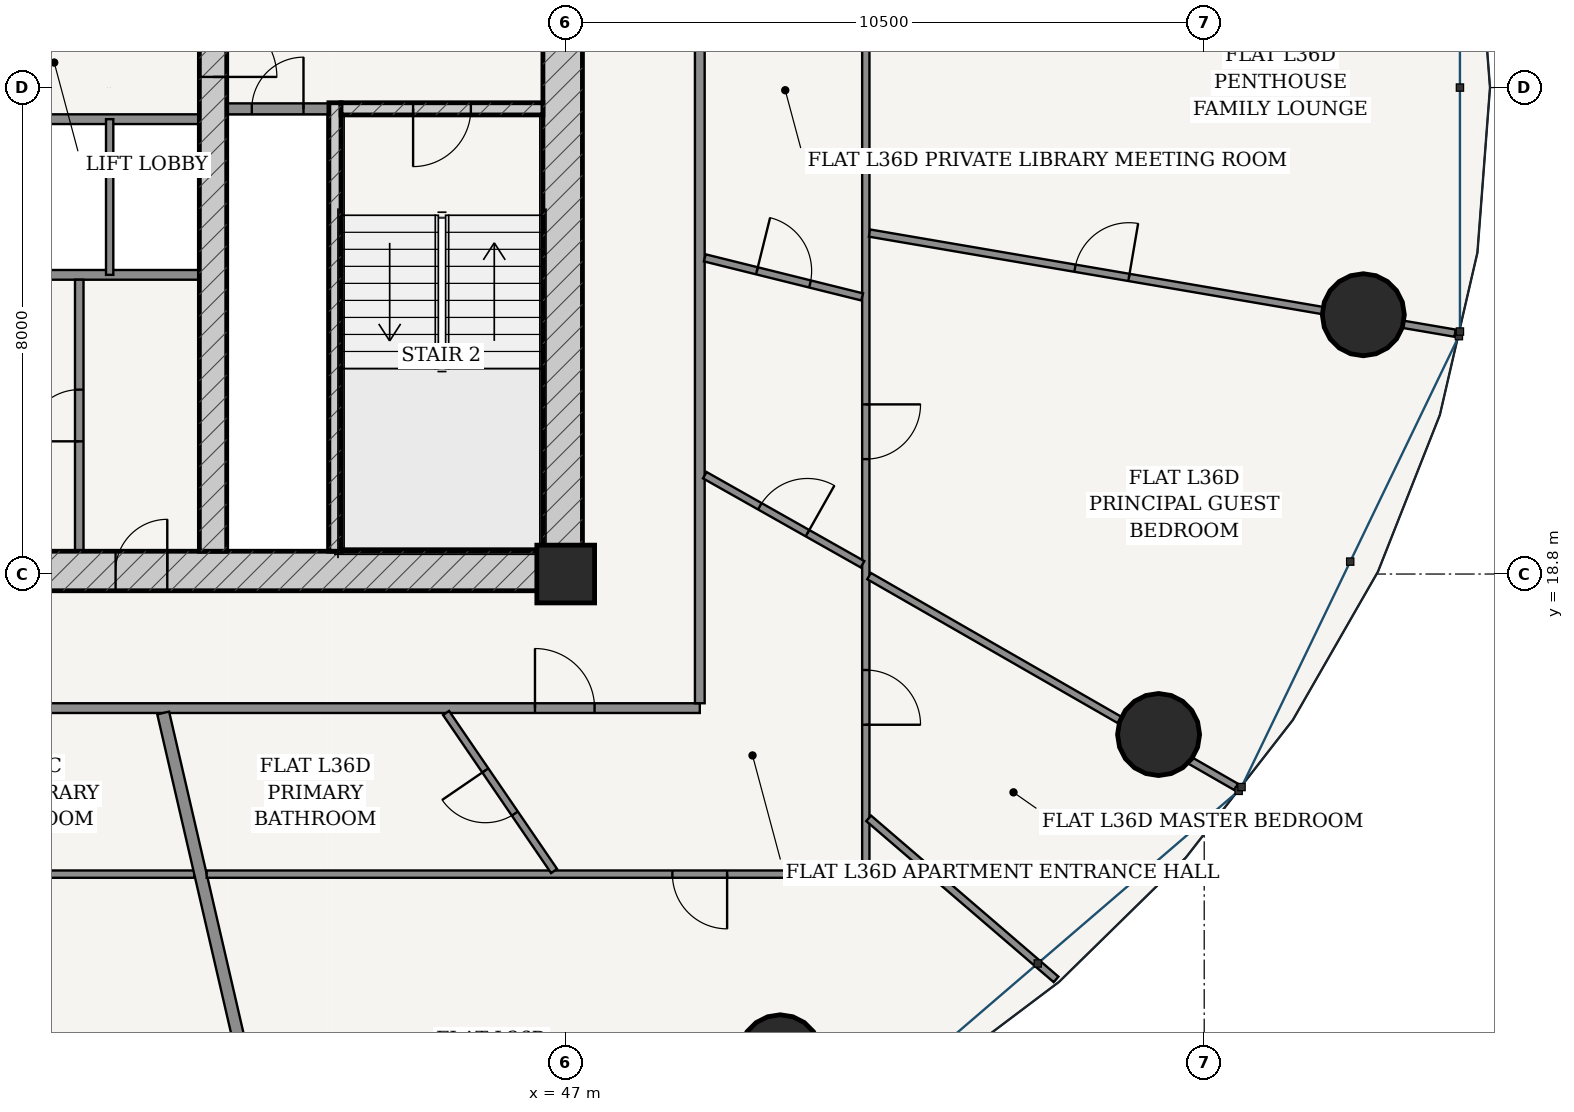
"""IFC4 building model, lengths in metres.
Left out: names, types, materials, properties, quantities, classifications, styles, units other than length and angle.
Written with IfcOpenShell. Run it as: python <this file> out.ifc"""

import sys

from ifc_helpers import new_model, si_unit, direction, frame, frame_2d, origin, origin_2d, place, context, subcontext, project, spatial, rectangle, hollow_circle, extrude, source, transform, mapped, element, fill, save


model = new_model("IFC4")
c1 = context("Model", 3, precision=1e-05, world=origin(), true_north=direction((-0.2419218956, 0.970295726276)))
c2 = subcontext(c1, "Body", "Model", "MODEL_VIEW")
j1 = project(units=[si_unit("LENGTHUNIT", "METRE"), si_unit("PLANEANGLEUNIT", "RADIAN")], contexts=[c1])
p1 = place(None, origin())
s1 = spatial("IfcSite", under=j1, at=p1, CompositionType="ELEMENT")
p2 = place(p1, origin())
s2 = spatial("IfcBuilding", under=s1, at=p2, CompositionType="ELEMENT")
p3 = place(p2, frame((0.0, 0.0, 139.0)))
s3 = spatial("IfcBuildingStorey", under=s2, at=p3, CompositionType="ELEMENT", Elevation=139.0)
p4 = place(p3, frame((47.0, 18.8, 0.0), z_axis=(0.0, 0.0, 1.0), x_axis=(1.0, 0.0, 0.0)))
e1 = element("IfcColumn", 1, at=p4, inside=s3, PredefinedType="COLUMN", context=c2, shape_type="SweptSolid", body=[
    extrude(rectangle(XDim=0.95, YDim=0.95, at=origin_2d()), origin(), (0.0, 0.0, 1.0), 3.6),
])
p5 = place(p3, frame((28.725, 18.85, 0.0), z_axis=(0.0, 0.0, 1.0), x_axis=(1.0, 0.0, 0.0)))
e2 = element("IfcWall", 2, at=p5, inside=s3, PredefinedType="SHEAR", context=c2, shape_type="SweptSolid", body=[
    extrude(rectangle(XDim=18.55, YDim=0.65, at=frame_2d((9.275, 0.0))), origin(), (0.0, 0.0, 1.0), 3.33),
])
p6 = place(p5, frame((6.827, 0.0, 0.0)))
e3 = element("IfcOpeningElement", 3, at=p6, cuts=e2, PredefinedType="OPENING", context=c2, shape_type="SweptSolid", body=[
    extrude(rectangle(XDim=0.85, YDim=2.1, at=frame_2d((0.425, 1.05))), frame((0.0, 0.335, 0.0), z_axis=(0.0, -1.0, 0.0), x_axis=(1.0, 0.0, 0.0)), (0.0, 0.0, 1.0), 0.67),
])
p7 = place(p5, frame((8.85, 0.0, 0.0)))
e4 = element("IfcOpeningElement", 4, at=p7, cuts=e2, PredefinedType="OPENING", context=c2, shape_type="SweptSolid", body=[
    extrude(rectangle(XDim=0.85, YDim=2.1, at=frame_2d((0.425, 1.05))), frame((0.0, 0.335, 0.0), z_axis=(0.0, -1.0, 0.0), x_axis=(1.0, 0.0, 0.0)), (0.0, 0.0, 1.0), 0.67),
])
p8 = place(p5, frame((10.873, 0.0, 0.0)))
e5 = element("IfcOpeningElement", 5, at=p8, cuts=e2, PredefinedType="OPENING", context=c2, shape_type="SweptSolid", body=[
    extrude(rectangle(XDim=0.85, YDim=2.1, at=frame_2d((0.425, 1.05))), frame((0.0, 0.335, 0.0), z_axis=(0.0, -1.0, 0.0), x_axis=(1.0, 0.0, 0.0)), (0.0, 0.0, 1.0), 0.67),
])
p9 = place(p3, frame((46.95, 19.175, 0.0), z_axis=(0.0, 0.0, 1.0), x_axis=(0.0, 1.0, 0.0)))
e6 = element("IfcWall", 6, at=p9, inside=s3, PredefinedType="SHEAR", context=c2, shape_type="SweptSolid", body=[
    extrude(rectangle(XDim=15.25, YDim=0.65, at=frame_2d((7.625, 0.0))), origin(), (0.0, 0.0, 1.0), 3.33),
])
p10 = place(p9, frame((9.875, 0.0, 0.0)))
e7 = element("IfcOpeningElement", 7, at=p10, cuts=e6, PredefinedType="OPENING", context=c2, shape_type="SweptSolid", body=[
    extrude(rectangle(XDim=1.5, YDim=2.2, at=frame_2d((0.75, 1.1))), frame((0.0, 0.335, 0.0), z_axis=(0.0, -1.0, 0.0), x_axis=(1.0, 0.0, 0.0)), (0.0, 0.0, 1.0), 0.67),
])
p11 = place(p3, frame((43.205, 19.175, 0.0), z_axis=(0.0, 0.0, 1.0), x_axis=(0.0, 1.0, 0.0)))
e8 = element("IfcWall", 8, at=p11, inside=s3, PredefinedType="SOLIDWALL", context=c2, shape_type="SweptSolid", body=[
    extrude(rectangle(XDim=7.375, YDim=0.2, at=frame_2d((3.688, 0.0))), origin(), (0.0, 0.0, 1.0), 3.33),
])
p12 = place(p3, frame((43.305, 26.45, 0.0), z_axis=(0.0, 0.0, 1.0), x_axis=(1.0, 0.0, 0.0)))
e9 = element("IfcWall", 9, at=p12, inside=s3, PredefinedType="SOLIDWALL", context=c2, shape_type="SweptSolid", body=[
    extrude(rectangle(XDim=3.32, YDim=0.2, at=frame_2d((1.66, 0.0))), origin(), (0.0, 0.0, 1.0), 3.33),
])
p13 = place(p12, frame((1.185, 0.0, 0.0)))
e10 = element("IfcOpeningElement", 10, at=p13, cuts=e9, PredefinedType="OPENING", context=c2, shape_type="SweptSolid", body=[
    extrude(rectangle(XDim=0.95, YDim=2.15, at=frame_2d((0.475, 1.075))), frame((0.0, 0.11, 0.0), z_axis=(0.0, -1.0, 0.0), x_axis=(1.0, 0.0, 0.0)), (0.0, 0.0, 1.0), 0.22),
])
p14 = place(p3, frame((41.2, 19.175, 0.0), z_axis=(0.0, 0.0, 1.0), x_axis=(0.0, 1.0, 0.0)))
e11 = element("IfcWall", 11, at=p14, inside=s3, PredefinedType="SHEAR", context=c2, shape_type="SweptSolid", body=[
    extrude(rectangle(XDim=15.25, YDim=0.45, at=frame_2d((7.625, 0.0))), origin(), (0.0, 0.0, 1.0), 3.33),
])
p15 = place(p14, frame((7.8, 0.0, 0.0)))
e12 = element("IfcOpeningElement", 12, at=p15, cuts=e11, PredefinedType="OPENING", context=c2, shape_type="SweptSolid", body=[
    extrude(rectangle(XDim=1.05, YDim=2.15, at=frame_2d((0.525, 1.075))), frame((0.0, 0.235, 0.0), z_axis=(0.0, -1.0, 0.0), x_axis=(1.0, 0.0, 0.0)), (0.0, 0.0, 1.0), 0.47),
])
for number, where, z_axis, x_axis in (
    (13, (50.528, 10.877, 0.0), (0.0, 0.0, 1.0), (1.0, 0.0, 0.0)),
    (14, (56.75, 16.161, 0.0), (0.0, 0.0, 1.0), (1.0, 0.0, 0.0)),
    (15, (60.117, 23.064, 0.0), (0.0, 0.0, 1.0), (1.0, 0.0, 0.0)),
):
    element("IfcColumn", number, at=place(p3, frame(where, z_axis=z_axis, x_axis=x_axis)), inside=s3, PredefinedType="COLUMN", context=c2, shape_type="SweptSolid", body=[
        extrude(hollow_circle(Radius=0.675, WallThickness=0.042, at=origin_2d()), origin(), (0.0, 0.0, 1.0), 3.6),
    ])
p16 = place(p3, frame((41.425, 26.45, 0.0), z_axis=(0.0, 0.0, 1.0), x_axis=(1.0, 0.0, 0.0)))
e16 = element("IfcWall", 16, at=p16, inside=s3, PredefinedType="PARTITIONING", context=c2, shape_type="SweptSolid", body=[
    extrude(rectangle(XDim=1.675, YDim=0.18, at=frame_2d((0.837, 0.0))), origin(), (0.0, 0.0, 1.0), 3.33),
])
p17 = place(p16, frame((0.413, 0.0, 0.0)))
e17 = element("IfcOpeningElement", 17, at=p17, cuts=e16, PredefinedType="OPENING", context=c2, shape_type="SweptSolid", body=[
    extrude(rectangle(XDim=0.85, YDim=2.1, at=frame_2d((0.425, 1.05))), frame((0.0, 0.1, 0.0), z_axis=(0.0, -1.0, 0.0), x_axis=(1.0, 0.0, 0.0)), (0.0, 0.0, 1.0), 0.2),
])
p18 = place(p3, frame((35.025, 26.28, 0.0), z_axis=(0.0, 0.0, 1.0), x_axis=(1.0, 0.0, 0.0)))
e18 = element("IfcWall", 18, at=p18, inside=s3, PredefinedType="PARTITIONING", context=c2, shape_type="SweptSolid", body=[
    extrude(rectangle(XDim=5.95, YDim=0.16, at=frame_2d((2.975, 0.0))), origin(), (0.0, 0.0, 1.0), 3.33),
])
p19 = place(p18, frame((0.19, 0.0, 0.0)))
e19 = element("IfcOpeningElement", 19, at=p19, cuts=e18, PredefinedType="OPENING", context=c2, shape_type="SweptSolid", body=[
    extrude(rectangle(XDim=1.1, YDim=2.2, at=frame_2d((0.55, 1.1))), frame((0.0, 0.09, 0.0), z_axis=(0.0, -1.0, 0.0), x_axis=(1.0, 0.0, 0.0)), (0.0, 0.0, 1.0), 0.18),
])
p20 = place(p18, frame((1.67, 0.0, 0.0)))
e20 = element("IfcOpeningElement", 20, at=p20, cuts=e18, PredefinedType="OPENING", context=c2, shape_type="SweptSolid", body=[
    extrude(rectangle(XDim=1.1, YDim=2.2, at=frame_2d((0.55, 1.1))), frame((0.0, 0.09, 0.0), z_axis=(0.0, -1.0, 0.0), x_axis=(1.0, 0.0, 0.0)), (0.0, 0.0, 1.0), 0.18),
])
p21 = place(p3, frame((35.025, 23.72, 0.0), z_axis=(0.0, 0.0, 1.0), x_axis=(1.0, 0.0, 0.0)))
e21 = element("IfcWall", 21, at=p21, inside=s3, PredefinedType="PARTITIONING", context=c2, shape_type="SweptSolid", body=[
    extrude(rectangle(XDim=5.95, YDim=0.16, at=frame_2d((2.975, 0.0))), origin(), (0.0, 0.0, 1.0), 3.33),
])
p22 = place(p3, frame((39.5, 23.72, 0.0), z_axis=(0.0, 0.0, 1.0), x_axis=(0.0, 1.0, 0.0)))
e22 = element("IfcWall", 22, at=p22, inside=s3, PredefinedType="PARTITIONING", context=c2, shape_type="SweptSolid", body=[
    extrude(rectangle(XDim=2.56, YDim=0.12, at=frame_2d((1.28, 0.0))), origin(), (0.0, 0.0, 1.0), 3.33),
])
p23 = place(p3, frame((39.0, 19.175, 0.0), z_axis=(0.0, 0.0, 1.0), x_axis=(0.0, 1.0, 0.0)))
e23 = element("IfcWall", 23, at=p23, inside=s3, PredefinedType="PARTITIONING", context=c2, shape_type="SweptSolid", body=[
    extrude(rectangle(XDim=4.465, YDim=0.14, at=frame_2d((2.232, 0.0))), origin(), (0.0, 0.0, 1.0), 3.33),
])
p24 = place(p23, frame((1.808, 0.0, 0.0)))
e24 = element("IfcOpeningElement", 24, at=p24, cuts=e23, PredefinedType="OPENING", context=c2, shape_type="SweptSolid", body=[
    extrude(rectangle(XDim=0.85, YDim=2.1, at=frame_2d((0.425, 1.05))), frame((0.0, 0.08, 0.0), z_axis=(0.0, -1.0, 0.0), x_axis=(1.0, 0.0, 0.0)), (0.0, 0.0, 1.0), 0.16),
])
p25 = place(p3, frame((34.32, 16.595, 0.0), z_axis=(0.0, 0.0, 1.0), x_axis=(1.0, 0.0, 0.0)))
e25 = element("IfcWall", 25, at=p25, inside=s3, PredefinedType="PARTITIONING", context=c2, shape_type="SweptSolid", body=[
    extrude(rectangle(XDim=14.885, YDim=0.16, at=frame_2d((7.442, 0.0))), origin(), (0.0, 0.0, 1.0), 2.776),
])
p26 = place(p25, frame((12.174, 0.0, 0.0)))
e26 = element("IfcOpeningElement", 26, at=p26, cuts=e25, PredefinedType="OPENING", context=c2, shape_type="SweptSolid", body=[
    extrude(rectangle(XDim=0.98, YDim=2.2, at=frame_2d((0.49, 1.1))), frame((0.0, 0.09, 0.0), z_axis=(0.0, -1.0, 0.0), x_axis=(1.0, 0.0, 0.0)), (0.0, 0.0, 1.0), 0.18),
])
p27 = place(p3, frame((49.205, 16.675, 0.0), z_axis=(0.0, 0.0, 1.0), x_axis=(0.0, 1.0, 0.0)))
e27 = element("IfcWall", 27, at=p27, inside=s3, PredefinedType="PARTITIONING", context=c2, shape_type="SweptSolid", body=[
    extrude(rectangle(XDim=18.4, YDim=0.16, at=frame_2d((9.2, 0.0))), origin(), (0.0, 0.0, 1.0), 2.776),
])
p28 = place(p3, frame((40.892, 13.865, 0.0), z_axis=(0.0, 0.0, 1.0), x_axis=(-1.0, 0.0, 0.0)))
e28 = element("IfcWall", 28, at=p28, inside=s3, PredefinedType="PARTITIONING", context=c2, shape_type="SweptSolid", body=[
    extrude(rectangle(XDim=9.302, YDim=0.12, at=frame_2d((4.651, 0.0))), origin(), (0.0, 0.0, 1.0), 2.776),
])
p29 = place(p28, frame((7.652, 0.0, 0.0)))
e29 = element("IfcOpeningElement", 29, at=p29, cuts=e28, PredefinedType="OPENING", context=c2, shape_type="SweptSolid", body=[
    extrude(rectangle(XDim=0.9, YDim=2.15, at=frame_2d((0.45, 1.075))), frame((0.0, 0.07, 0.0), z_axis=(0.0, -1.0, 0.0), x_axis=(1.0, 0.0, 0.0)), (0.0, 0.0, 1.0), 0.14),
])
p30 = place(p3, frame((40.38, 16.515, 0.0), z_axis=(0.0, 0.0, 1.0), x_axis=(0.225473598067, -0.974249278457, 0.0)))
e30 = element("IfcWall", 30, at=p30, inside=s3, PredefinedType="PARTITIONING", context=c2, shape_type="SweptSolid", body=[
    extrude(rectangle(XDim=10.278, YDim=0.2, at=frame_2d((5.139, 0.0))), origin(), (0.0, 0.0, 1.0), 2.776),
])
p31 = place(p3, frame((51.935, 29.08, 0.0), z_axis=(0.0, 0.0, 1.0), x_axis=(0.0, -1.0, 0.0)))
e31 = element("IfcWall", 31, at=p31, inside=s3, PredefinedType="PARTITIONING", context=c2, shape_type="SweptSolid", body=[
    extrude(rectangle(XDim=15.215, YDim=0.12, at=frame_2d((7.608, 0.0))), origin(), (0.0, 0.0, 1.0), 2.776),
])
p32 = place(p31, frame((11.859, 0.0, 0.0)))
e32 = element("IfcOpeningElement", 32, at=p32, cuts=e31, PredefinedType="OPENING", context=c2, shape_type="SweptSolid", body=[
    extrude(rectangle(XDim=0.9, YDim=2.15, at=frame_2d((0.45, 1.075))), frame((0.0, 0.07, 0.0), z_axis=(0.0, -1.0, 0.0), x_axis=(1.0, 0.0, 0.0)), (0.0, 0.0, 1.0), 0.14),
])
p33 = place(p31, frame((7.49, 0.0, 0.0)))
e33 = element("IfcOpeningElement", 33, at=p33, cuts=e31, PredefinedType="OPENING", context=c2, shape_type="SweptSolid", body=[
    extrude(rectangle(XDim=0.9, YDim=2.15, at=frame_2d((0.45, 1.075))), frame((0.0, 0.07, 0.0), z_axis=(0.0, -1.0, 0.0), x_axis=(1.0, 0.0, 0.0)), (0.0, 0.0, 1.0), 0.14),
])
p34 = place(p3, frame((51.935, 13.865, 0.0), z_axis=(0.0, 0.0, 1.0), x_axis=(-1.0, 0.0, 0.0)))
e34 = element("IfcWall", 34, at=p34, inside=s3, PredefinedType="PARTITIONING", context=c2, shape_type="SweptSolid", body=[
    extrude(rectangle(XDim=10.84, YDim=0.12, at=frame_2d((5.42, 0.0))), origin(), (0.0, 0.0, 1.0), 2.776),
])
p35 = place(p34, frame((2.281, 0.0, 0.0)))
e35 = element("IfcOpeningElement", 35, at=p35, cuts=e34, PredefinedType="OPENING", context=c2, shape_type="SweptSolid", body=[
    extrude(rectangle(XDim=0.9, YDim=2.15, at=frame_2d((0.45, 1.075))), frame((0.0, 0.07, 0.0), z_axis=(0.0, -1.0, 0.0), x_axis=(1.0, 0.0, 0.0)), (0.0, 0.0, 1.0), 0.14),
])
p36 = place(p3, frame((51.982, 14.782, 0.0), z_axis=(0.0, 0.0, 1.0), x_axis=(0.758356837469, -0.651839632935, 0.0)))
e36 = element("IfcWall", 36, at=p36, inside=s3, PredefinedType="PARTITIONING", context=c2, shape_type="SweptSolid", body=[
    extrude(rectangle(XDim=4.064, YDim=0.12, at=frame_2d((2.032, 0.0))), origin(), (0.0, 0.0, 1.0), 2.846),
])
p37 = place(p3, frame((51.989, 18.766, 0.0), z_axis=(0.0, 0.0, 1.0), x_axis=(0.86717064002, -0.498011125466, 0.0)))
e37 = element("IfcWall", 37, at=p37, inside=s3, PredefinedType="PARTITIONING", context=c2, shape_type="SweptSolid", body=[
    extrude(rectangle(XDim=6.961, YDim=0.12, at=frame_2d((3.48, 0.0))), origin(), (0.0, 0.0, 1.0), 2.776),
])
p38 = place(p3, frame((51.996, 24.407, 0.0), z_axis=(0.0, 0.0, 1.0), x_axis=(0.985698378271, -0.168519159369, 0.0)))
e38 = element("IfcWall", 38, at=p38, inside=s3, PredefinedType="PARTITIONING", context=c2, shape_type="SweptSolid", body=[
    extrude(rectangle(XDim=9.769, YDim=0.12, at=frame_2d((4.884, 0.0))), origin(), (0.0, 0.0, 1.0), 2.776),
])
p39 = place(p38, frame((3.428, 0.0, 0.0)))
e39 = element("IfcOpeningElement", 39, at=p39, cuts=e38, PredefinedType="OPENING", context=c2, shape_type="SweptSolid", body=[
    extrude(rectangle(XDim=0.9, YDim=2.15, at=frame_2d((0.45, 1.075))), frame((0.0, 0.07, 0.0), z_axis=(0.0, -1.0, 0.0), x_axis=(1.0, 0.0, 0.0)), (0.0, 0.0, 1.0), 0.14),
])
p40 = place(p3, frame((45.032, 16.515, 0.0), z_axis=(0.0, 0.0, 1.0), x_axis=(0.564486512722, -0.825442291717, 0.0)))
e40 = element("IfcWall", 40, at=p40, inside=s3, PredefinedType="PARTITIONING", context=c2, shape_type="SweptSolid", body=[
    extrude(rectangle(XDim=3.148, YDim=0.12, at=frame_2d((1.574, 0.0))), origin(), (0.0, 0.0, 1.0), 3.005),
])
p41 = place(p40, frame((1.144, 0.0, 0.0)))
e41 = element("IfcOpeningElement", 41, at=p41, cuts=e40, PredefinedType="OPENING", context=c2, shape_type="SweptSolid", body=[
    extrude(rectangle(XDim=0.86, YDim=2.15, at=frame_2d((0.43, 1.075))), frame((0.0, 0.07, 0.0), z_axis=(0.0, -1.0, 0.0), x_axis=(1.0, 0.0, 0.0)), (0.0, 0.0, 1.0), 0.14),
])
p42 = place(p3, frame((49.287, 20.426, 0.0), z_axis=(0.0, 0.0, 1.0), x_axis=(0.870723023576, -0.491773744942, 0.0)))
e42 = element("IfcWall", 42, at=p42, inside=s3, PredefinedType="PARTITIONING", context=c2, shape_type="SweptSolid", body=[
    extrude(rectangle(XDim=2.98, YDim=0.12, at=frame_2d((1.49, 0.0))), origin(), (0.0, 0.0, 1.0), 2.776),
])
p43 = place(p42, frame((1.04, 0.0, 0.0)))
e43 = element("IfcOpeningElement", 43, at=p43, cuts=e42, PredefinedType="OPENING", context=c2, shape_type="SweptSolid", body=[
    extrude(rectangle(XDim=0.9, YDim=2.15, at=frame_2d((0.45, 1.075))), frame((0.0, 0.07, 0.0), z_axis=(0.0, -1.0, 0.0), x_axis=(1.0, 0.0, 0.0)), (0.0, 0.0, 1.0), 0.14),
])
p44 = place(p3, frame((49.287, 23.999, 0.0), z_axis=(0.0, 0.0, 1.0), x_axis=(0.970571855633, -0.240811696256, 0.0)))
e44 = element("IfcWall", 44, at=p44, inside=s3, PredefinedType="PARTITIONING", context=c2, shape_type="SweptSolid", body=[
    extrude(rectangle(XDim=2.666, YDim=0.12, at=frame_2d((1.333, 0.0))), origin(), (0.0, 0.0, 1.0), 3.33),
])
p45 = place(p44, frame((0.883, 0.0, 0.0)))
e45 = element("IfcOpeningElement", 45, at=p45, cuts=e44, PredefinedType="OPENING", context=c2, shape_type="SweptSolid", body=[
    extrude(rectangle(XDim=0.9, YDim=2.15, at=frame_2d((0.45, 1.075))), frame((0.0, 0.07, 0.0), z_axis=(0.0, -1.0, 0.0), x_axis=(1.0, 0.0, 0.0)), (0.0, 0.0, 1.0), 0.14),
])
m1 = source(origin(), c2, "Body", "SweptSolid", [
    extrude(rectangle(XDim=1.05, YDim=2.15, at=frame_2d((0.525, 1.075))), frame((0.0, 0.025, 0.0), z_axis=(0.0, -1.0, 0.0), x_axis=(1.0, 0.0, 0.0)), (0.0, 0.0, 1.0), 0.05),
])
p46 = place(p15, frame((1.05, 0.0, 0.0), z_axis=(0.0, 0.0, 1.0), x_axis=(-1.0, 0.0, 0.0)))
e46 = element("IfcDoor", 46, at=p46, inside=s3, OperationType="SINGLE_SWING_RIGHT", PredefinedType="DOOR", context=c2, shape_type="MappedRepresentation", body=[
    mapped(m1, transform((0.0, 0.0, 0.0), scale=1.0)),
])
fill(e12, e46)
m2 = source(origin(), c2, "Body", "SweptSolid", [
    extrude(rectangle(XDim=0.95, YDim=2.15, at=frame_2d((0.475, 1.075))), frame((0.0, 0.025, 0.0), z_axis=(0.0, -1.0, 0.0), x_axis=(1.0, 0.0, 0.0)), (0.0, 0.0, 1.0), 0.05),
])
p47 = place(p13, frame((0.95, 0.0, 0.0), z_axis=(0.0, 0.0, 1.0), x_axis=(-1.0, 0.0, 0.0)))
e47 = element("IfcDoor", 47, at=p47, inside=s3, OperationType="SINGLE_SWING_RIGHT", PredefinedType="DOOR", context=c2, shape_type="MappedRepresentation", body=[
    mapped(m2, transform((0.0, 0.0, 0.0), scale=1.0)),
])
fill(e10, e47)
m3 = source(origin(), c2, "Body", "SweptSolid", [
    extrude(rectangle(XDim=0.85, YDim=2.1, at=frame_2d((0.425, 1.05))), frame((0.0, 0.025, 0.0), z_axis=(0.0, -1.0, 0.0), x_axis=(1.0, 0.0, 0.0)), (0.0, 0.0, 1.0), 0.05),
])
p48 = place(p17, origin())
e48 = element("IfcDoor", 48, at=p48, inside=s3, OperationType="SINGLE_SWING_RIGHT", PredefinedType="DOOR", context=c2, shape_type="MappedRepresentation", body=[
    mapped(m3, transform((0.0, 0.0, 0.0), scale=1.0)),
])
fill(e17, e48)
p49 = place(p8, origin())
e49 = element("IfcDoor", 49, at=p49, inside=s3, OperationType="SINGLE_SWING_RIGHT", PredefinedType="DOOR", context=c2, shape_type="MappedRepresentation", body=[
    mapped(m3, transform((0.0, 0.0, 0.0), scale=1.0)),
])
fill(e5, e49)
p50 = place(p24, origin())
e50 = element("IfcDoor", 50, at=p50, inside=s3, OperationType="SINGLE_SWING_LEFT", PredefinedType="DOOR", context=c2, shape_type="MappedRepresentation", body=[
    mapped(m3, transform((0.0, 0.0, 0.0), scale=1.0)),
])
fill(e24, e50)
m4 = source(origin(), c2, "Body", "SweptSolid", [
    extrude(rectangle(XDim=0.98, YDim=2.2, at=frame_2d((0.49, 1.1))), frame((0.0, 0.025, 0.0), z_axis=(0.0, -1.0, 0.0), x_axis=(1.0, 0.0, 0.0)), (0.0, 0.0, 1.0), 0.05),
])
p51 = place(p26, origin())
e51 = element("IfcDoor", 51, at=p51, inside=s3, OperationType="SINGLE_SWING_LEFT", PredefinedType="DOOR", context=c2, shape_type="MappedRepresentation", body=[
    mapped(m4, transform((0.0, 0.0, 0.0), scale=1.0)),
])
fill(e26, e51)
m5 = source(origin(), c2, "Body", "SweptSolid", [
    extrude(rectangle(XDim=0.86, YDim=2.15, at=frame_2d((0.43, 1.075))), frame((0.0, 0.025, 0.0), z_axis=(0.0, -1.0, 0.0), x_axis=(1.0, 0.0, 0.0)), (0.0, 0.0, 1.0), 0.05),
])
p52 = place(p41, frame((0.86, 0.0, 0.0), z_axis=(0.0, 0.0, 1.0), x_axis=(-1.0, 0.0, 0.0)))
e52 = element("IfcDoor", 52, at=p52, inside=s3, OperationType="SINGLE_SWING_RIGHT", PredefinedType="DOOR", context=c2, shape_type="MappedRepresentation", body=[
    mapped(m5, transform((0.0, 0.0, 0.0), scale=1.0)),
])
fill(e41, e52)
m6 = source(origin(), c2, "Body", "SweptSolid", [
    extrude(rectangle(XDim=0.9, YDim=2.15, at=frame_2d((0.45, 1.075))), frame((0.0, 0.025, 0.0), z_axis=(0.0, -1.0, 0.0), x_axis=(1.0, 0.0, 0.0)), (0.0, 0.0, 1.0), 0.05),
])
p53 = place(p35, origin())
e53 = element("IfcDoor", 53, at=p53, inside=s3, OperationType="SINGLE_SWING_LEFT", PredefinedType="DOOR", context=c2, shape_type="MappedRepresentation", body=[
    mapped(m6, transform((0.0, 0.0, 0.0), scale=1.0)),
])
fill(e35, e53)
p54 = place(p43, origin())
e54 = element("IfcDoor", 54, at=p54, inside=s3, OperationType="SINGLE_SWING_RIGHT", PredefinedType="DOOR", context=c2, shape_type="MappedRepresentation", body=[
    mapped(m6, transform((0.0, 0.0, 0.0), scale=1.0)),
])
fill(e43, e54)
p55 = place(p45, origin())
e55 = element("IfcDoor", 55, at=p55, inside=s3, OperationType="SINGLE_SWING_LEFT", PredefinedType="DOOR", context=c2, shape_type="MappedRepresentation", body=[
    mapped(m6, transform((0.0, 0.0, 0.0), scale=1.0)),
])
fill(e45, e55)
p56 = place(p32, origin())
e56 = element("IfcDoor", 56, at=p56, inside=s3, OperationType="SINGLE_SWING_RIGHT", PredefinedType="DOOR", context=c2, shape_type="MappedRepresentation", body=[
    mapped(m6, transform((0.0, 0.0, 0.0), scale=1.0)),
])
fill(e32, e56)
p57 = place(p33, origin())
e57 = element("IfcDoor", 57, at=p57, inside=s3, OperationType="SINGLE_SWING_LEFT", PredefinedType="DOOR", context=c2, shape_type="MappedRepresentation", body=[
    mapped(m6, transform((0.0, 0.0, 0.0), scale=1.0)),
])
fill(e33, e57)
p58 = place(p39, origin())
e58 = element("IfcDoor", 58, at=p58, inside=s3, OperationType="SINGLE_SWING_RIGHT", PredefinedType="DOOR", context=c2, shape_type="MappedRepresentation", body=[
    mapped(m6, transform((0.0, 0.0, 0.0), scale=1.0)),
])
fill(e39, e58)
save(model, sys.argv[1])
